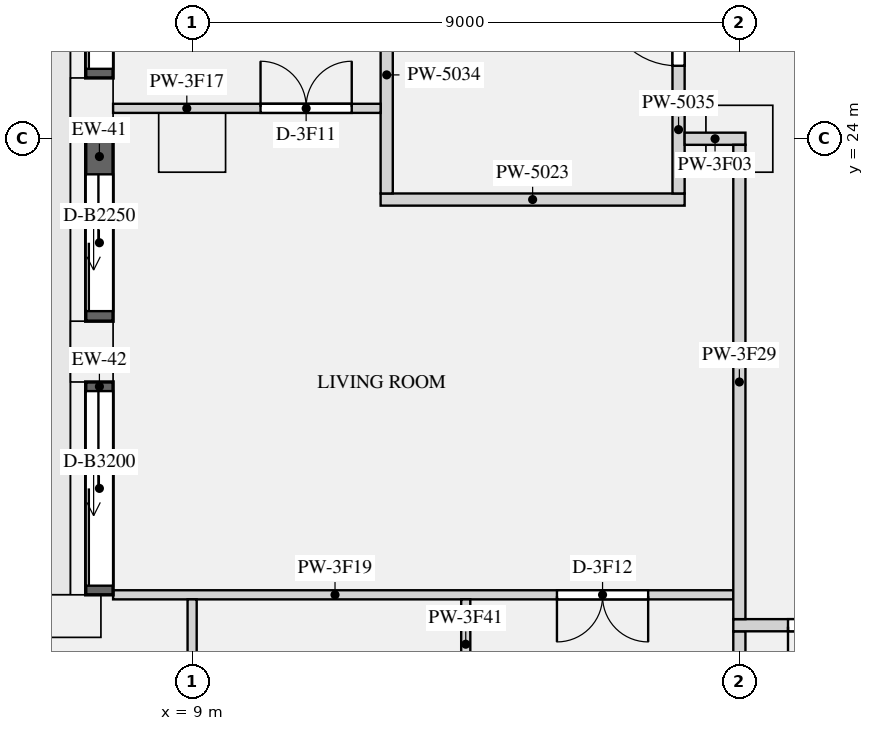
"""IFC4 building model, lengths in metres.
Left out: names, types, materials, properties, quantities, classifications, styles, units other than length and angle.
Written with IfcOpenShell. Run it as: python <this file> out.ifc"""

import sys

from ifc_helpers import new_model, si_unit, direction, frame, frame_2d, origin, origin_2d, place, context, subcontext, project, spatial, rectangle, extrude, element, fill, save


model = new_model("IFC4")
c1 = context("Model", 3, precision=1e-05, world=origin(), true_north=direction((0.0, 1.0)))
c2 = subcontext(c1, "Body", "Model", "MODEL_VIEW")
j1 = project(units=[si_unit("LENGTHUNIT", "METRE"), si_unit("PLANEANGLEUNIT", "RADIAN")], contexts=[c1])
p1 = place(None, origin())
s1 = spatial("IfcSite", under=j1, at=p1, CompositionType="ELEMENT")
p2 = place(p1, origin())
s2 = spatial("IfcBuilding", under=s1, at=p2, CompositionType="ELEMENT")
p3 = place(p2, frame((0.0, 0.0, 179.1)))
s3 = spatial("IfcBuildingStorey", under=s2, at=p3, CompositionType="ELEMENT", Elevation=179.1)
for number, where, z_axis, x_axis in (
    (1, (7.35, 24.5, 0.0), (0.0, 0.0, 1.0), (0.0, -1.0, 0.0)),
    (2, (7.35, 20.5, 0.0), (0.0, 0.0, 1.0), (0.0, -1.0, 0.0)),
    (3, (7.0, 16.15, 0.0), (0.0, 0.0, 1.0), (-1.0, 0.0, 0.0)),
):
    element("IfcColumn", number, at=place(p3, frame(where, z_axis=z_axis, x_axis=x_axis)), inside=s3, PredefinedType="USERDEFINED", context=c2, shape_type="SweptSolid", body=[
        extrude(rectangle(XDim=1.0, YDim=0.7, at=origin_2d()), origin(), (0.0, 0.0, 1.0), 3.15),
    ])
for number, where, z_axis, x_axis in (
    (4, (9.0, 24.0, 0.0), (0.0, 0.0, 1.0), (1.0, 0.0, 0.0)),
    (5, (18.0, 24.0, 0.0), (0.0, 0.0, 1.0), (1.0, 0.0, 0.0)),
):
    element("IfcColumn", number, at=place(p3, frame(where, z_axis=z_axis, x_axis=x_axis)), inside=s3, PredefinedType="COLUMN", context=c2, shape_type="SweptSolid", body=[
        extrude(rectangle(XDim=1.1, YDim=1.1, at=origin_2d()), origin(), (0.0, 0.0, 1.0), 3.15),
    ])
p4 = place(p3, frame((7.475, 28.0, 0.0), z_axis=(0.0, 0.0, 1.0), x_axis=(0.0, -1.0, 0.0)))
e6 = element("IfcWall", 6, at=p4, inside=s3, PredefinedType="SOLIDWALL", context=c2, shape_type="SweptSolid", body=[
    extrude(rectangle(XDim=3.0, YDim=0.45, at=frame_2d((1.5, 0.0))), origin(), (0.0, 0.0, 1.0), 2.83),
])
p5 = place(p4, frame((0.15, 0.0, 0.0)))
e7 = element("IfcOpeningElement", 7, at=p5, cuts=e6, PredefinedType="OPENING", context=c2, shape_type="SweptSolid", body=[
    extrude(rectangle(XDim=2.7, YDim=2.3, at=frame_2d((1.35, 1.15))), frame((0.0, 0.235, 0.0), z_axis=(0.0, -1.0, 0.0), x_axis=(1.0, 0.0, 0.0)), (0.0, 0.0, 1.0), 0.47),
])
p6 = place(p3, frame((7.475, 24.0, 0.0), z_axis=(0.0, 0.0, 1.0), x_axis=(0.0, -1.0, 0.0)))
e8 = element("IfcWall", 8, at=p6, inside=s3, PredefinedType="SOLIDWALL", context=c2, shape_type="SweptSolid", body=[
    extrude(rectangle(XDim=3.0, YDim=0.45, at=frame_2d((1.5, 0.0))), origin(), (0.0, 0.0, 1.0), 2.83),
])
p7 = place(p6, frame((0.585, 0.0, 0.0)))
e9 = element("IfcOpeningElement", 9, at=p7, cuts=e8, PredefinedType="OPENING", context=c2, shape_type="SweptSolid", body=[
    extrude(rectangle(XDim=2.25, YDim=2.3, at=frame_2d((1.125, 1.15))), frame((0.0, 0.235, 0.0), z_axis=(0.0, -1.0, 0.0), x_axis=(1.0, 0.0, 0.0)), (0.0, 0.0, 1.0), 0.47),
])
p8 = place(p3, frame((7.475, 20.0, 0.0), z_axis=(0.0, 0.0, 1.0), x_axis=(0.0, -1.0, 0.0)))
e10 = element("IfcWall", 10, at=p8, inside=s3, PredefinedType="SOLIDWALL", context=c2, shape_type="SweptSolid", body=[
    extrude(rectangle(XDim=3.5, YDim=0.45, at=frame_2d((1.75, 0.0))), origin(), (0.0, 0.0, 1.0), 2.83),
])
p9 = place(p8, frame((0.15, 0.0, 0.0)))
e11 = element("IfcOpeningElement", 11, at=p9, cuts=e10, PredefinedType="OPENING", context=c2, shape_type="SweptSolid", body=[
    extrude(rectangle(XDim=3.2, YDim=2.3, at=frame_2d((1.6, 1.15))), frame((0.0, 0.235, 0.0), z_axis=(0.0, -1.0, 0.0), x_axis=(1.0, 0.0, 0.0)), (0.0, 0.0, 1.0), 0.47),
])
p10 = place(p3, frame((12.1, 23.0, 0.0), z_axis=(0.0, 0.0, 1.0), x_axis=(1.0, 0.0, 0.0)))
e12 = element("IfcWall", 12, at=p10, inside=s3, PredefinedType="PARTITIONING", context=c2, shape_type="SweptSolid", body=[
    extrude(rectangle(XDim=5.0, YDim=0.2, at=frame_2d((2.5, 0.0))), origin(), (0.0, 0.0, 1.0), 2.83),
])
p11 = place(p3, frame((18.0, 12.5, 0.0), z_axis=(0.0, 0.0, 1.0), x_axis=(0.0, 1.0, 0.0)))
e13 = element("IfcWall", 13, at=p11, inside=s3, PredefinedType="PARTITIONING", context=c2, shape_type="SweptSolid", body=[
    extrude(rectangle(XDim=3.4, YDim=0.2, at=frame_2d((1.7, 0.0))), origin(), (0.0, 0.0, 1.0), 2.83),
])
p12 = place(p3, frame((12.2, 23.1, 0.0), z_axis=(0.0, 0.0, 1.0), x_axis=(0.0, 1.0, 0.0)))
e14 = element("IfcWall", 14, at=p12, inside=s3, PredefinedType="PARTITIONING", context=c2, shape_type="SweptSolid", body=[
    extrude(rectangle(XDim=3.9, YDim=0.2, at=frame_2d((1.95, 0.0))), origin(), (0.0, 0.0, 1.0), 2.83),
])
p13 = place(p3, frame((17.0, 23.1, 0.0), z_axis=(0.0, 0.0, 1.0), x_axis=(0.0, 1.0, 0.0)))
e15 = element("IfcWall", 15, at=p13, inside=s3, PredefinedType="PARTITIONING", context=c2, shape_type="SweptSolid", body=[
    extrude(rectangle(XDim=3.8, YDim=0.2, at=frame_2d((1.9, 0.0))), origin(), (0.0, 0.0, 1.0), 2.83),
])
p14 = place(p13, frame((2.1, 0.0, 0.0)))
e16 = element("IfcOpeningElement", 16, at=p14, cuts=e15, PredefinedType="OPENING", context=c2, shape_type="SweptSolid", body=[
    extrude(rectangle(XDim=1.2, YDim=2.1, at=frame_2d((0.6, 1.05))), frame((0.0, 0.11, 0.0), z_axis=(0.0, -1.0, 0.0), x_axis=(1.0, 0.0, 0.0)), (0.0, 0.0, 1.0), 0.22),
])
p15 = place(p3, frame((17.1, 24.0, 0.0), z_axis=(0.0, 0.0, 1.0), x_axis=(1.0, 0.0, 0.0)))
e17 = element("IfcWall", 17, at=p15, inside=s3, PredefinedType="PARTITIONING", context=c2, shape_type="SweptSolid", body=[
    extrude(rectangle(XDim=1.0, YDim=0.2, at=frame_2d((0.5, 0.0))), origin(), (0.0, 0.0, 1.0), 2.83),
])
p16 = place(p3, frame((7.7, 24.5, 0.0), z_axis=(0.0, 0.0, 1.0), x_axis=(1.0, 0.0, 0.0)))
e18 = element("IfcWall", 18, at=p16, inside=s3, PredefinedType="PARTITIONING", context=c2, shape_type="SweptSolid", body=[
    extrude(rectangle(XDim=4.4, YDim=0.15, at=frame_2d((2.2, 0.0))), origin(), (0.0, 0.0, 1.0), 2.83),
])
p17 = place(p16, frame((2.425, 0.0, 0.0)))
e19 = element("IfcOpeningElement", 19, at=p17, cuts=e18, PredefinedType="OPENING", context=c2, shape_type="SweptSolid", body=[
    extrude(rectangle(XDim=1.5, YDim=2.1, at=frame_2d((0.75, 1.05))), frame((0.0, 0.085, 0.0), z_axis=(0.0, -1.0, 0.0), x_axis=(1.0, 0.0, 0.0)), (0.0, 0.0, 1.0), 0.17),
])
p18 = place(p3, frame((7.7, 16.5, 0.0), z_axis=(0.0, 0.0, 1.0), x_axis=(1.0, 0.0, 0.0)))
e20 = element("IfcWall", 20, at=p18, inside=s3, PredefinedType="PARTITIONING", context=c2, shape_type="SweptSolid", body=[
    extrude(rectangle(XDim=10.2, YDim=0.15, at=frame_2d((5.1, 0.0))), origin(), (0.0, 0.0, 1.0), 2.83),
])
p19 = place(p18, frame((7.3, 0.0, 0.0)))
e21 = element("IfcOpeningElement", 21, at=p19, cuts=e20, PredefinedType="OPENING", context=c2, shape_type="SweptSolid", body=[
    extrude(rectangle(XDim=1.5, YDim=2.1, at=frame_2d((0.75, 1.05))), frame((0.0, 0.085, 0.0), z_axis=(0.0, -1.0, 0.0), x_axis=(1.0, 0.0, 0.0)), (0.0, 0.0, 1.0), 0.17),
])
p20 = place(p3, frame((17.9, 16.0, 0.0), z_axis=(0.0, 0.0, 1.0), x_axis=(1.0, 0.0, 0.0)))
e22 = element("IfcWall", 22, at=p20, inside=s3, PredefinedType="PARTITIONING", context=c2, shape_type="SweptSolid", body=[
    extrude(rectangle(XDim=36.2, YDim=0.2, at=frame_2d((18.1, 0.0))), origin(), (0.0, 0.0, 1.0), 2.83),
])
p21 = place(p20, frame((0.9, 0.0, 0.0)))
e23 = element("IfcOpeningElement", 23, at=p21, cuts=e22, PredefinedType="OPENING", context=c2, shape_type="SweptSolid", body=[
    extrude(rectangle(XDim=1.4, YDim=2.1, at=frame_2d((0.7, 1.05))), frame((0.0, 0.11, 0.0), z_axis=(0.0, -1.0, 0.0), x_axis=(1.0, 0.0, 0.0)), (0.0, 0.0, 1.0), 0.22),
])
p22 = place(p20, frame((33.9, 0.0, 0.0)))
e24 = element("IfcOpeningElement", 24, at=p22, cuts=e22, PredefinedType="OPENING", context=c2, shape_type="SweptSolid", body=[
    extrude(rectangle(XDim=1.4, YDim=2.1, at=frame_2d((0.7, 1.05))), frame((0.0, 0.11, 0.0), z_axis=(0.0, -1.0, 0.0), x_axis=(1.0, 0.0, 0.0)), (0.0, 0.0, 1.0), 0.22),
])
p23 = place(p3, frame((18.0, 16.1, 0.0), z_axis=(0.0, 0.0, 1.0), x_axis=(0.0, 1.0, 0.0)))
e25 = element("IfcWall", 25, at=p23, inside=s3, PredefinedType="PARTITIONING", context=c2, shape_type="SweptSolid", body=[
    extrude(rectangle(XDim=7.8, YDim=0.2, at=frame_2d((3.9, 0.0))), origin(), (0.0, 0.0, 1.0), 2.83),
])
p24 = place(p3, frame((9.0, 5.2, 0.0), z_axis=(0.0, 0.0, 1.0), x_axis=(0.0, 1.0, 0.0)))
e26 = element("IfcWall", 26, at=p24, inside=s3, PredefinedType="PARTITIONING", context=c2, shape_type="SweptSolid", body=[
    extrude(rectangle(XDim=11.225, YDim=0.15, at=frame_2d((5.613, 0.0))), origin(), (0.0, 0.0, 1.0), 2.83),
])
p25 = place(p24, frame((4.575, 0.0, 0.0)))
e27 = element("IfcOpeningElement", 27, at=p25, cuts=e26, PredefinedType="OPENING", context=c2, shape_type="SweptSolid", body=[
    extrude(rectangle(XDim=0.9, YDim=2.1, at=frame_2d((0.45, 1.05))), frame((0.0, 0.085, 0.0), z_axis=(0.0, -1.0, 0.0), x_axis=(1.0, 0.0, 0.0)), (0.0, 0.0, 1.0), 0.17),
])
p26 = place(p3, frame((13.5, 12.575, 0.0), z_axis=(0.0, 0.0, 1.0), x_axis=(0.0, 1.0, 0.0)))
e28 = element("IfcWall", 28, at=p26, inside=s3, PredefinedType="PARTITIONING", context=c2, shape_type="SweptSolid", body=[
    extrude(rectangle(XDim=3.85, YDim=0.15, at=frame_2d((1.925, 0.0))), origin(), (0.0, 0.0, 1.0), 2.83),
])
p27 = place(p26, frame((1.475, 0.0, 0.0)))
e29 = element("IfcOpeningElement", 29, at=p27, cuts=e28, PredefinedType="OPENING", context=c2, shape_type="SweptSolid", body=[
    extrude(rectangle(XDim=0.9, YDim=2.1, at=frame_2d((0.45, 1.05))), frame((0.0, 0.085, 0.0), z_axis=(0.0, -1.0, 0.0), x_axis=(1.0, 0.0, 0.0)), (0.0, 0.0, 1.0), 0.17),
])
p28 = place(p5, origin())
e30 = element("IfcDoor", 30, at=p28, inside=s3, OperationType="SLIDING_TO_LEFT", PredefinedType="DOOR", context=c2, shape_type="SweptSolid", body=[
    extrude(rectangle(XDim=2.7, YDim=2.3, at=frame_2d((1.35, 1.15))), frame((0.0, -0.07, 0.0), z_axis=(0.0, -1.0, 0.0), x_axis=(1.0, 0.0, 0.0)), (0.0, 0.0, 1.0), 0.05),
])
fill(e7, e30)
p29 = place(p7, origin())
e31 = element("IfcDoor", 31, at=p29, inside=s3, OperationType="SLIDING_TO_LEFT", PredefinedType="DOOR", context=c2, shape_type="SweptSolid", body=[
    extrude(rectangle(XDim=2.25, YDim=2.3, at=frame_2d((1.125, 1.15))), frame((0.0, -0.07, 0.0), z_axis=(0.0, -1.0, 0.0), x_axis=(1.0, 0.0, 0.0)), (0.0, 0.0, 1.0), 0.05),
])
fill(e9, e31)
p30 = place(p9, origin())
e32 = element("IfcDoor", 32, at=p30, inside=s3, OperationType="SLIDING_TO_LEFT", PredefinedType="DOOR", context=c2, shape_type="SweptSolid", body=[
    extrude(rectangle(XDim=3.2, YDim=2.3, at=frame_2d((1.6, 1.15))), frame((0.0, -0.07, 0.0), z_axis=(0.0, -1.0, 0.0), x_axis=(1.0, 0.0, 0.0)), (0.0, 0.0, 1.0), 0.05),
])
fill(e11, e32)
p31 = place(p14, origin())
e33 = element("IfcDoor", 33, at=p31, inside=s3, OperationType="SINGLE_SWING_RIGHT", PredefinedType="DOOR", context=c2, shape_type="SweptSolid", body=[
    extrude(rectangle(XDim=1.2, YDim=2.1, at=frame_2d((0.6, 1.05))), frame((0.0, 0.025, 0.0), z_axis=(0.0, -1.0, 0.0), x_axis=(1.0, 0.0, 0.0)), (0.0, 0.0, 1.0), 0.05),
])
fill(e16, e33)
p32 = place(p21, frame((1.4, 0.0, 0.0), z_axis=(0.0, 0.0, 1.0), x_axis=(-1.0, 0.0, 0.0)))
e34 = element("IfcDoor", 34, at=p32, inside=s3, OperationType="DOUBLE_DOOR_SINGLE_SWING", PredefinedType="DOOR", context=c2, shape_type="SweptSolid", body=[
    extrude(rectangle(XDim=1.4, YDim=2.1, at=frame_2d((0.7, 1.05))), frame((0.0, 0.025, 0.0), z_axis=(0.0, -1.0, 0.0), x_axis=(1.0, 0.0, 0.0)), (0.0, 0.0, 1.0), 0.05),
])
fill(e23, e34)
p33 = place(p17, origin())
e35 = element("IfcDoor", 35, at=p33, inside=s3, OperationType="DOUBLE_DOOR_SINGLE_SWING", PredefinedType="DOOR", context=c2, shape_type="SweptSolid", body=[
    extrude(rectangle(XDim=1.5, YDim=2.1, at=frame_2d((0.75, 1.05))), frame((0.0, 0.025, 0.0), z_axis=(0.0, -1.0, 0.0), x_axis=(1.0, 0.0, 0.0)), (0.0, 0.0, 1.0), 0.05),
])
fill(e19, e35)
p34 = place(p19, frame((1.5, 0.0, 0.0), z_axis=(0.0, 0.0, 1.0), x_axis=(-1.0, 0.0, 0.0)))
e36 = element("IfcDoor", 36, at=p34, inside=s3, OperationType="DOUBLE_DOOR_SINGLE_SWING", PredefinedType="DOOR", context=c2, shape_type="SweptSolid", body=[
    extrude(rectangle(XDim=1.5, YDim=2.1, at=frame_2d((0.75, 1.05))), frame((0.0, 0.025, 0.0), z_axis=(0.0, -1.0, 0.0), x_axis=(1.0, 0.0, 0.0)), (0.0, 0.0, 1.0), 0.05),
])
fill(e21, e36)
save(model, sys.argv[1])
